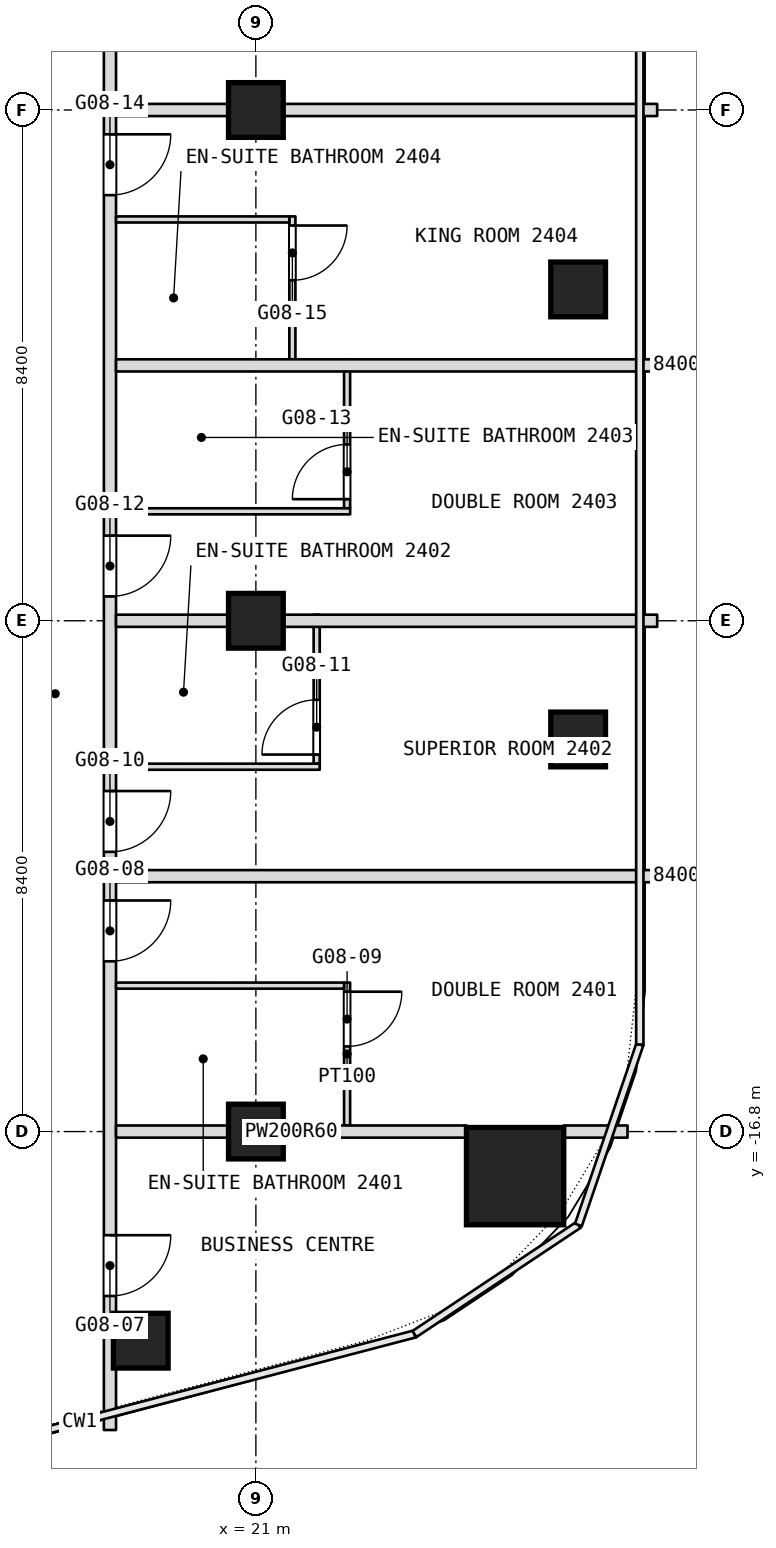
"""IFC4 building model, lengths in metres.
Left out: names, types, materials, properties, quantities, classifications, styles, units other than length and angle.
Written with IfcOpenShell. Run it as: python <this file> out.ifc"""

import sys

from ifc_helpers import new_model, si_unit, direction, frame, frame_2d, origin, origin_2d, place, context, subcontext, project, spatial, rectangle, extrude, element, fill, save


model = new_model("IFC4")
c1 = context("Model", 3, precision=1e-05, world=origin(), true_north=direction((0.0, 1.0)))
c2 = subcontext(c1, "Body", "Model", "MODEL_VIEW")
j1 = project(units=[si_unit("LENGTHUNIT", "METRE"), si_unit("PLANEANGLEUNIT", "RADIAN")], contexts=[c1])
p1 = place(None, origin())
s1 = spatial("IfcSite", under=j1, at=p1, CompositionType="ELEMENT")
p2 = place(p1, origin())
s2 = spatial("IfcBuilding", under=s1, at=p2, CompositionType="ELEMENT")
p3 = place(p2, frame((0.0, 0.0, 112.1)))
s3 = spatial("IfcBuildingStorey", under=s2, at=p3, CompositionType="ELEMENT", Elevation=112.1)
p4 = place(p3, frame((25.263, -17.533, 0.0), z_axis=(0.0, 0.0, 1.0), x_axis=(1.0, 0.0, 0.0)))
e1 = element("IfcColumn", 1, at=p4, inside=s3, PredefinedType="COLUMN", context=c2, shape_type="SweptSolid", body=[
    extrude(rectangle(XDim=1.6, YDim=1.6, at=origin_2d()), origin(), (0.0, 0.0, 1.0), 3.6),
])
for number, where, z_axis, x_axis in (
    (2, (21.0, -16.8, 0.0), (0.0, 0.0, 1.0), (1.0, 0.0, 0.0)),
    (3, (21.0, -8.4, 0.0), (0.0, 0.0, 1.0), (1.0, 0.0, 0.0)),
    (4, (21.0, 0.0, 0.0), (0.0, 0.0, 1.0), (1.0, 0.0, 0.0)),
    (5, (26.3, -2.951, 0.0), (0.0, 0.0, 1.0), (1.0, 0.0, 0.0)),
    (6, (26.3, -10.352, 0.0), (0.0, 0.0, 1.0), (1.0, 0.0, 0.0)),
    (7, (19.107, -20.239, 0.0), (0.0, 0.0, 1.0), (1.0, 0.0, 0.0)),
):
    element("IfcColumn", number, at=place(p3, frame(where, z_axis=z_axis, x_axis=x_axis)), inside=s3, PredefinedType="COLUMN", context=c2, shape_type="SweptSolid", body=[
        extrude(rectangle(XDim=0.9, YDim=0.9, at=origin_2d()), origin(), (0.0, 0.0, 1.0), 3.6),
    ])
p5 = place(p3, frame((22.5, -16.7, 0.0), z_axis=(0.0, 0.0, 1.0), x_axis=(0.0, 1.0, 0.0)))
e8 = element("IfcWall", 8, at=p5, inside=s3, PredefinedType="PARTITIONING", context=c2, shape_type="SweptSolid", body=[
    extrude(rectangle(XDim=2.35, YDim=0.1, at=frame_2d((1.175, 0.0))), origin(), (0.0, 0.0, 1.0), 3.34),
])
p6 = place(p5, frame((1.3, 0.0, 0.0)))
e9 = element("IfcOpeningElement", 9, at=p6, cuts=e8, PredefinedType="OPENING", context=c2, shape_type="SweptSolid", body=[
    extrude(rectangle(XDim=0.9, YDim=2.1, at=frame_2d((0.45, 1.05))), frame((0.0, 0.05, 0.0), z_axis=(0.0, -1.0, 0.0), x_axis=(1.0, 0.0, 0.0)), (0.0, 0.0, 1.0), 0.1),
])
p7 = place(p3, frame((22.5, -6.55, 0.0), z_axis=(0.0, 0.0, 1.0), x_axis=(0.0, 1.0, 0.0)))
e10 = element("IfcWall", 10, at=p7, inside=s3, PredefinedType="PARTITIONING", context=c2, shape_type="SweptSolid", body=[
    extrude(rectangle(XDim=2.45, YDim=0.1, at=frame_2d((1.225, 0.0))), origin(), (0.0, 0.0, 1.0), 3.34),
])
p8 = place(p7, frame((0.15, 0.0, 0.0)))
e11 = element("IfcOpeningElement", 11, at=p8, cuts=e10, PredefinedType="OPENING", context=c2, shape_type="SweptSolid", body=[
    extrude(rectangle(XDim=0.9, YDim=2.1, at=frame_2d((0.45, 1.05))), frame((0.0, 0.05, 0.0), z_axis=(0.0, -1.0, 0.0), x_axis=(1.0, 0.0, 0.0)), (0.0, 0.0, 1.0), 0.1),
])
p9 = place(p3, frame((22.0, -10.75, 0.0), z_axis=(0.0, 0.0, 1.0), x_axis=(0.0, 1.0, 0.0)))
e12 = element("IfcWall", 12, at=p9, inside=s3, PredefinedType="PARTITIONING", context=c2, shape_type="SweptSolid", body=[
    extrude(rectangle(XDim=2.45, YDim=0.1, at=frame_2d((1.225, 0.0))), origin(), (0.0, 0.0, 1.0), 3.34),
])
p10 = place(p9, frame((0.15, 0.0, 0.0)))
e13 = element("IfcOpeningElement", 13, at=p10, cuts=e12, PredefinedType="OPENING", context=c2, shape_type="SweptSolid", body=[
    extrude(rectangle(XDim=0.9, YDim=2.1, at=frame_2d((0.45, 1.05))), frame((0.0, 0.05, 0.0), z_axis=(0.0, -1.0, 0.0), x_axis=(1.0, 0.0, 0.0)), (0.0, 0.0, 1.0), 0.1),
])
p11 = place(p3, frame((21.6, -4.1, 0.0), z_axis=(0.0, 0.0, 1.0), x_axis=(0.0, 1.0, 0.0)))
e14 = element("IfcWall", 14, at=p11, inside=s3, PredefinedType="PARTITIONING", context=c2, shape_type="SweptSolid", body=[
    extrude(rectangle(XDim=2.35, YDim=0.1, at=frame_2d((1.175, 0.0))), origin(), (0.0, 0.0, 1.0), 3.34),
])
p12 = place(p11, frame((1.3, 0.0, 0.0)))
e15 = element("IfcOpeningElement", 15, at=p12, cuts=e14, PredefinedType="OPENING", context=c2, shape_type="SweptSolid", body=[
    extrude(rectangle(XDim=0.9, YDim=2.1, at=frame_2d((0.45, 1.05))), frame((0.0, 0.05, 0.0), z_axis=(0.0, -1.0, 0.0), x_axis=(1.0, 0.0, 0.0)), (0.0, 0.0, 1.0), 0.1),
])
p13 = place(p3, frame((18.6, -21.708, 0.0), z_axis=(0.0, 0.0, 1.0), x_axis=(0.0, 1.0, 0.0)))
e16 = element("IfcWall", 16, at=p13, inside=s3, PredefinedType="PARTITIONING", context=c2, shape_type="SweptSolid", body=[
    extrude(rectangle(XDim=49.648, YDim=0.2, at=frame_2d((24.824, 0.0))), origin(), (0.0, 0.0, 1.0), 3.34),
])
p14 = place(p13, frame((2.204, 0.0, 0.0)))
e17 = element("IfcOpeningElement", 17, at=p14, cuts=e16, PredefinedType="OPENING", context=c2, shape_type="SweptSolid", body=[
    extrude(rectangle(XDim=1.0, YDim=2.1, at=frame_2d((0.5, 1.05))), frame((0.0, 0.1, 0.0), z_axis=(0.0, -1.0, 0.0), x_axis=(1.0, 0.0, 0.0)), (0.0, 0.0, 1.0), 0.2),
])
p15 = place(p13, frame((7.708, 0.0, 0.0)))
e18 = element("IfcOpeningElement", 18, at=p15, cuts=e16, PredefinedType="OPENING", context=c2, shape_type="SweptSolid", body=[
    extrude(rectangle(XDim=1.0, YDim=2.1, at=frame_2d((0.5, 1.05))), frame((0.0, 0.1, 0.0), z_axis=(0.0, -1.0, 0.0), x_axis=(1.0, 0.0, 0.0)), (0.0, 0.0, 1.0), 0.2),
])
p16 = place(p13, frame((9.508, 0.0, 0.0)))
e19 = element("IfcOpeningElement", 19, at=p16, cuts=e16, PredefinedType="OPENING", context=c2, shape_type="SweptSolid", body=[
    extrude(rectangle(XDim=1.0, YDim=2.1, at=frame_2d((0.5, 1.05))), frame((0.0, 0.1, 0.0), z_axis=(0.0, -1.0, 0.0), x_axis=(1.0, 0.0, 0.0)), (0.0, 0.0, 1.0), 0.2),
])
p17 = place(p13, frame((13.708, 0.0, 0.0)))
e20 = element("IfcOpeningElement", 20, at=p17, cuts=e16, PredefinedType="OPENING", context=c2, shape_type="SweptSolid", body=[
    extrude(rectangle(XDim=1.0, YDim=2.1, at=frame_2d((0.5, 1.05))), frame((0.0, 0.1, 0.0), z_axis=(0.0, -1.0, 0.0), x_axis=(1.0, 0.0, 0.0)), (0.0, 0.0, 1.0), 0.2),
])
p18 = place(p13, frame((20.308, 0.0, 0.0)))
e21 = element("IfcOpeningElement", 21, at=p18, cuts=e16, PredefinedType="OPENING", context=c2, shape_type="SweptSolid", body=[
    extrude(rectangle(XDim=1.0, YDim=2.1, at=frame_2d((0.5, 1.05))), frame((0.0, 0.1, 0.0), z_axis=(0.0, -1.0, 0.0), x_axis=(1.0, 0.0, 0.0)), (0.0, 0.0, 1.0), 0.2),
])
p19 = place(p13, frame((25.008, 0.0, 0.0)))
e22 = element("IfcOpeningElement", 22, at=p19, cuts=e16, PredefinedType="OPENING", context=c2, shape_type="SweptSolid", body=[
    extrude(rectangle(XDim=1.8, YDim=2.1, at=frame_2d((0.9, 1.05))), frame((0.0, 0.1, 0.0), z_axis=(0.0, -1.0, 0.0), x_axis=(1.0, 0.0, 0.0)), (0.0, 0.0, 1.0), 0.2),
])
p20 = place(p13, frame((30.508, 0.0, 0.0)))
e23 = element("IfcOpeningElement", 23, at=p20, cuts=e16, PredefinedType="OPENING", context=c2, shape_type="SweptSolid", body=[
    extrude(rectangle(XDim=1.0, YDim=2.1, at=frame_2d((0.5, 1.05))), frame((0.0, 0.1, 0.0), z_axis=(0.0, -1.0, 0.0), x_axis=(1.0, 0.0, 0.0)), (0.0, 0.0, 1.0), 0.2),
])
p21 = place(p13, frame((37.108, 0.0, 0.0)))
e24 = element("IfcOpeningElement", 24, at=p21, cuts=e16, PredefinedType="OPENING", context=c2, shape_type="SweptSolid", body=[
    extrude(rectangle(XDim=1.0, YDim=2.1, at=frame_2d((0.5, 1.05))), frame((0.0, 0.1, 0.0), z_axis=(0.0, -1.0, 0.0), x_axis=(1.0, 0.0, 0.0)), (0.0, 0.0, 1.0), 0.2),
])
p22 = place(p13, frame((42.608, 0.0, 0.0)))
e25 = element("IfcOpeningElement", 25, at=p22, cuts=e16, PredefinedType="OPENING", context=c2, shape_type="SweptSolid", body=[
    extrude(rectangle(XDim=1.0, YDim=2.1, at=frame_2d((0.5, 1.05))), frame((0.0, 0.1, 0.0), z_axis=(0.0, -1.0, 0.0), x_axis=(1.0, 0.0, 0.0)), (0.0, 0.0, 1.0), 0.2),
])
p23 = place(p13, frame((44.608, 0.0, 0.0)))
e26 = element("IfcOpeningElement", 26, at=p23, cuts=e16, PredefinedType="OPENING", context=c2, shape_type="SweptSolid", body=[
    extrude(rectangle(XDim=1.0, YDim=2.1, at=frame_2d((0.5, 1.05))), frame((0.0, 0.1, 0.0), z_axis=(0.0, -1.0, 0.0), x_axis=(1.0, 0.0, 0.0)), (0.0, 0.0, 1.0), 0.2),
])
p24 = place(p3, frame((18.7, -16.8, 0.0), z_axis=(0.0, 0.0, 1.0), x_axis=(1.0, 0.0, 0.0)))
e27 = element("IfcWall", 27, at=p24, inside=s3, PredefinedType="PARTITIONING", context=c2, shape_type="SweptSolid", body=[
    extrude(rectangle(XDim=5.763, YDim=0.2, at=frame_2d((2.881, 0.0))), origin(), (0.0, 0.0, 1.0), 2.89),
])
p25 = place(p3, frame((26.063, -16.8, 0.0), z_axis=(0.0, 0.0, 1.0), x_axis=(1.0, 0.0, 0.0)))
e28 = element("IfcWall", 28, at=p25, inside=s3, PredefinedType="PARTITIONING", context=c2, shape_type="SweptSolid", body=[
    extrude(rectangle(XDim=1.049, YDim=0.2, at=frame_2d((0.524, 0.0))), origin(), (0.0, 0.0, 1.0), 3.34),
])
p26 = place(p3, frame((18.7, -14.4, 0.0), z_axis=(0.0, 0.0, 1.0), x_axis=(1.0, 0.0, 0.0)))
e29 = element("IfcWall", 29, at=p26, inside=s3, PredefinedType="PARTITIONING", context=c2, shape_type="SweptSolid", body=[
    extrude(rectangle(XDim=3.75, YDim=0.1, at=frame_2d((1.875, 0.0))), origin(), (0.0, 0.0, 1.0), 3.34),
])
p27 = place(p3, frame((18.7, -12.6, 0.0), z_axis=(0.0, 0.0, 1.0), x_axis=(1.0, 0.0, 0.0)))
e30 = element("IfcWall", 30, at=p27, inside=s3, PredefinedType="PARTITIONING", context=c2, shape_type="SweptSolid", body=[
    extrude(rectangle(XDim=8.9, YDim=0.2, at=frame_2d((4.45, 0.0))), origin(), (0.0, 0.0, 1.0), 3.34),
])
p28 = place(p3, frame((18.7, -10.8, 0.0), z_axis=(0.0, 0.0, 1.0), x_axis=(1.0, 0.0, 0.0)))
e31 = element("IfcWall", 31, at=p28, inside=s3, PredefinedType="PARTITIONING", context=c2, shape_type="SweptSolid", body=[
    extrude(rectangle(XDim=3.35, YDim=0.1, at=frame_2d((1.675, 0.0))), origin(), (0.0, 0.0, 1.0), 3.34),
])
p29 = place(p3, frame((18.7, -8.4, 0.0), z_axis=(0.0, 0.0, 1.0), x_axis=(1.0, 0.0, 0.0)))
e32 = element("IfcWall", 32, at=p29, inside=s3, PredefinedType="PARTITIONING", context=c2, shape_type="SweptSolid", body=[
    extrude(rectangle(XDim=8.9, YDim=0.2, at=frame_2d((4.45, 0.0))), origin(), (0.0, 0.0, 1.0), 2.89),
])
p30 = place(p3, frame((18.7, -6.6, 0.0), z_axis=(0.0, 0.0, 1.0), x_axis=(1.0, 0.0, 0.0)))
e33 = element("IfcWall", 33, at=p30, inside=s3, PredefinedType="PARTITIONING", context=c2, shape_type="SweptSolid", body=[
    extrude(rectangle(XDim=3.85, YDim=0.1, at=frame_2d((1.925, 0.0))), origin(), (0.0, 0.0, 1.0), 3.34),
])
p31 = place(p3, frame((18.7, -4.2, 0.0), z_axis=(0.0, 0.0, 1.0), x_axis=(1.0, 0.0, 0.0)))
e34 = element("IfcWall", 34, at=p31, inside=s3, PredefinedType="PARTITIONING", context=c2, shape_type="SweptSolid", body=[
    extrude(rectangle(XDim=8.9, YDim=0.2, at=frame_2d((4.45, 0.0))), origin(), (0.0, 0.0, 1.0), 3.34),
])
p32 = place(p3, frame((18.7, -1.8, 0.0), z_axis=(0.0, 0.0, 1.0), x_axis=(1.0, 0.0, 0.0)))
e35 = element("IfcWall", 35, at=p32, inside=s3, PredefinedType="PARTITIONING", context=c2, shape_type="SweptSolid", body=[
    extrude(rectangle(XDim=2.85, YDim=0.1, at=frame_2d((1.425, 0.0))), origin(), (0.0, 0.0, 1.0), 3.34),
])
p33 = place(p3, frame((18.7, 0.0, 0.0), z_axis=(0.0, 0.0, 1.0), x_axis=(1.0, 0.0, 0.0)))
e36 = element("IfcWall", 36, at=p33, inside=s3, PredefinedType="PARTITIONING", context=c2, shape_type="SweptSolid", body=[
    extrude(rectangle(XDim=8.9, YDim=0.2, at=frame_2d((4.45, 0.0))), origin(), (0.0, 0.0, 1.0), 2.89),
])
p34 = place(p6, origin())
e37 = element("IfcDoor", 37, at=p34, inside=s3, OperationType="SINGLE_SWING_RIGHT", PredefinedType="DOOR", context=c2, shape_type="SweptSolid", body=[
    extrude(rectangle(XDim=0.9, YDim=2.1, at=frame_2d((0.45, 1.05))), frame((0.0, 0.025, 0.0), z_axis=(0.0, -1.0, 0.0), x_axis=(1.0, 0.0, 0.0)), (0.0, 0.0, 1.0), 0.05),
])
fill(e9, e37)
p35 = place(p8, origin())
e38 = element("IfcDoor", 38, at=p35, inside=s3, OperationType="SINGLE_SWING_LEFT", PredefinedType="DOOR", context=c2, shape_type="SweptSolid", body=[
    extrude(rectangle(XDim=0.9, YDim=2.1, at=frame_2d((0.45, 1.05))), frame((0.0, 0.025, 0.0), z_axis=(0.0, -1.0, 0.0), x_axis=(1.0, 0.0, 0.0)), (0.0, 0.0, 1.0), 0.05),
])
fill(e11, e38)
p36 = place(p10, origin())
e39 = element("IfcDoor", 39, at=p36, inside=s3, OperationType="SINGLE_SWING_LEFT", PredefinedType="DOOR", context=c2, shape_type="SweptSolid", body=[
    extrude(rectangle(XDim=0.9, YDim=2.1, at=frame_2d((0.45, 1.05))), frame((0.0, 0.025, 0.0), z_axis=(0.0, -1.0, 0.0), x_axis=(1.0, 0.0, 0.0)), (0.0, 0.0, 1.0), 0.05),
])
fill(e13, e39)
p37 = place(p12, origin())
e40 = element("IfcDoor", 40, at=p37, inside=s3, OperationType="SINGLE_SWING_RIGHT", PredefinedType="DOOR", context=c2, shape_type="SweptSolid", body=[
    extrude(rectangle(XDim=0.9, YDim=2.1, at=frame_2d((0.45, 1.05))), frame((0.0, 0.025, 0.0), z_axis=(0.0, -1.0, 0.0), x_axis=(1.0, 0.0, 0.0)), (0.0, 0.0, 1.0), 0.05),
])
fill(e15, e40)
p38 = place(p14, origin())
e41 = element("IfcDoor", 41, at=p38, inside=s3, OperationType="SINGLE_SWING_LEFT", PredefinedType="DOOR", context=c2, shape_type="SweptSolid", body=[
    extrude(rectangle(XDim=1.0, YDim=2.1, at=frame_2d((0.5, 1.05))), frame((0.0, 0.025, 0.0), z_axis=(0.0, -1.0, 0.0), x_axis=(1.0, 0.0, 0.0)), (0.0, 0.0, 1.0), 0.05),
])
fill(e17, e41)
p39 = place(p15, origin())
e42 = element("IfcDoor", 42, at=p39, inside=s3, OperationType="SINGLE_SWING_RIGHT", PredefinedType="DOOR", context=c2, shape_type="SweptSolid", body=[
    extrude(rectangle(XDim=1.0, YDim=2.1, at=frame_2d((0.5, 1.05))), frame((0.0, 0.025, 0.0), z_axis=(0.0, -1.0, 0.0), x_axis=(1.0, 0.0, 0.0)), (0.0, 0.0, 1.0), 0.05),
])
fill(e18, e42)
p40 = place(p16, origin())
e43 = element("IfcDoor", 43, at=p40, inside=s3, OperationType="SINGLE_SWING_RIGHT", PredefinedType="DOOR", context=c2, shape_type="SweptSolid", body=[
    extrude(rectangle(XDim=1.0, YDim=2.1, at=frame_2d((0.5, 1.05))), frame((0.0, 0.025, 0.0), z_axis=(0.0, -1.0, 0.0), x_axis=(1.0, 0.0, 0.0)), (0.0, 0.0, 1.0), 0.05),
])
fill(e19, e43)
p41 = place(p17, origin())
e44 = element("IfcDoor", 44, at=p41, inside=s3, OperationType="SINGLE_SWING_RIGHT", PredefinedType="DOOR", context=c2, shape_type="SweptSolid", body=[
    extrude(rectangle(XDim=1.0, YDim=2.1, at=frame_2d((0.5, 1.05))), frame((0.0, 0.025, 0.0), z_axis=(0.0, -1.0, 0.0), x_axis=(1.0, 0.0, 0.0)), (0.0, 0.0, 1.0), 0.05),
])
fill(e20, e44)
p42 = place(p18, origin())
e45 = element("IfcDoor", 45, at=p42, inside=s3, OperationType="SINGLE_SWING_RIGHT", PredefinedType="DOOR", context=c2, shape_type="SweptSolid", body=[
    extrude(rectangle(XDim=1.0, YDim=2.1, at=frame_2d((0.5, 1.05))), frame((0.0, 0.025, 0.0), z_axis=(0.0, -1.0, 0.0), x_axis=(1.0, 0.0, 0.0)), (0.0, 0.0, 1.0), 0.05),
])
fill(e21, e45)
save(model, sys.argv[1])
